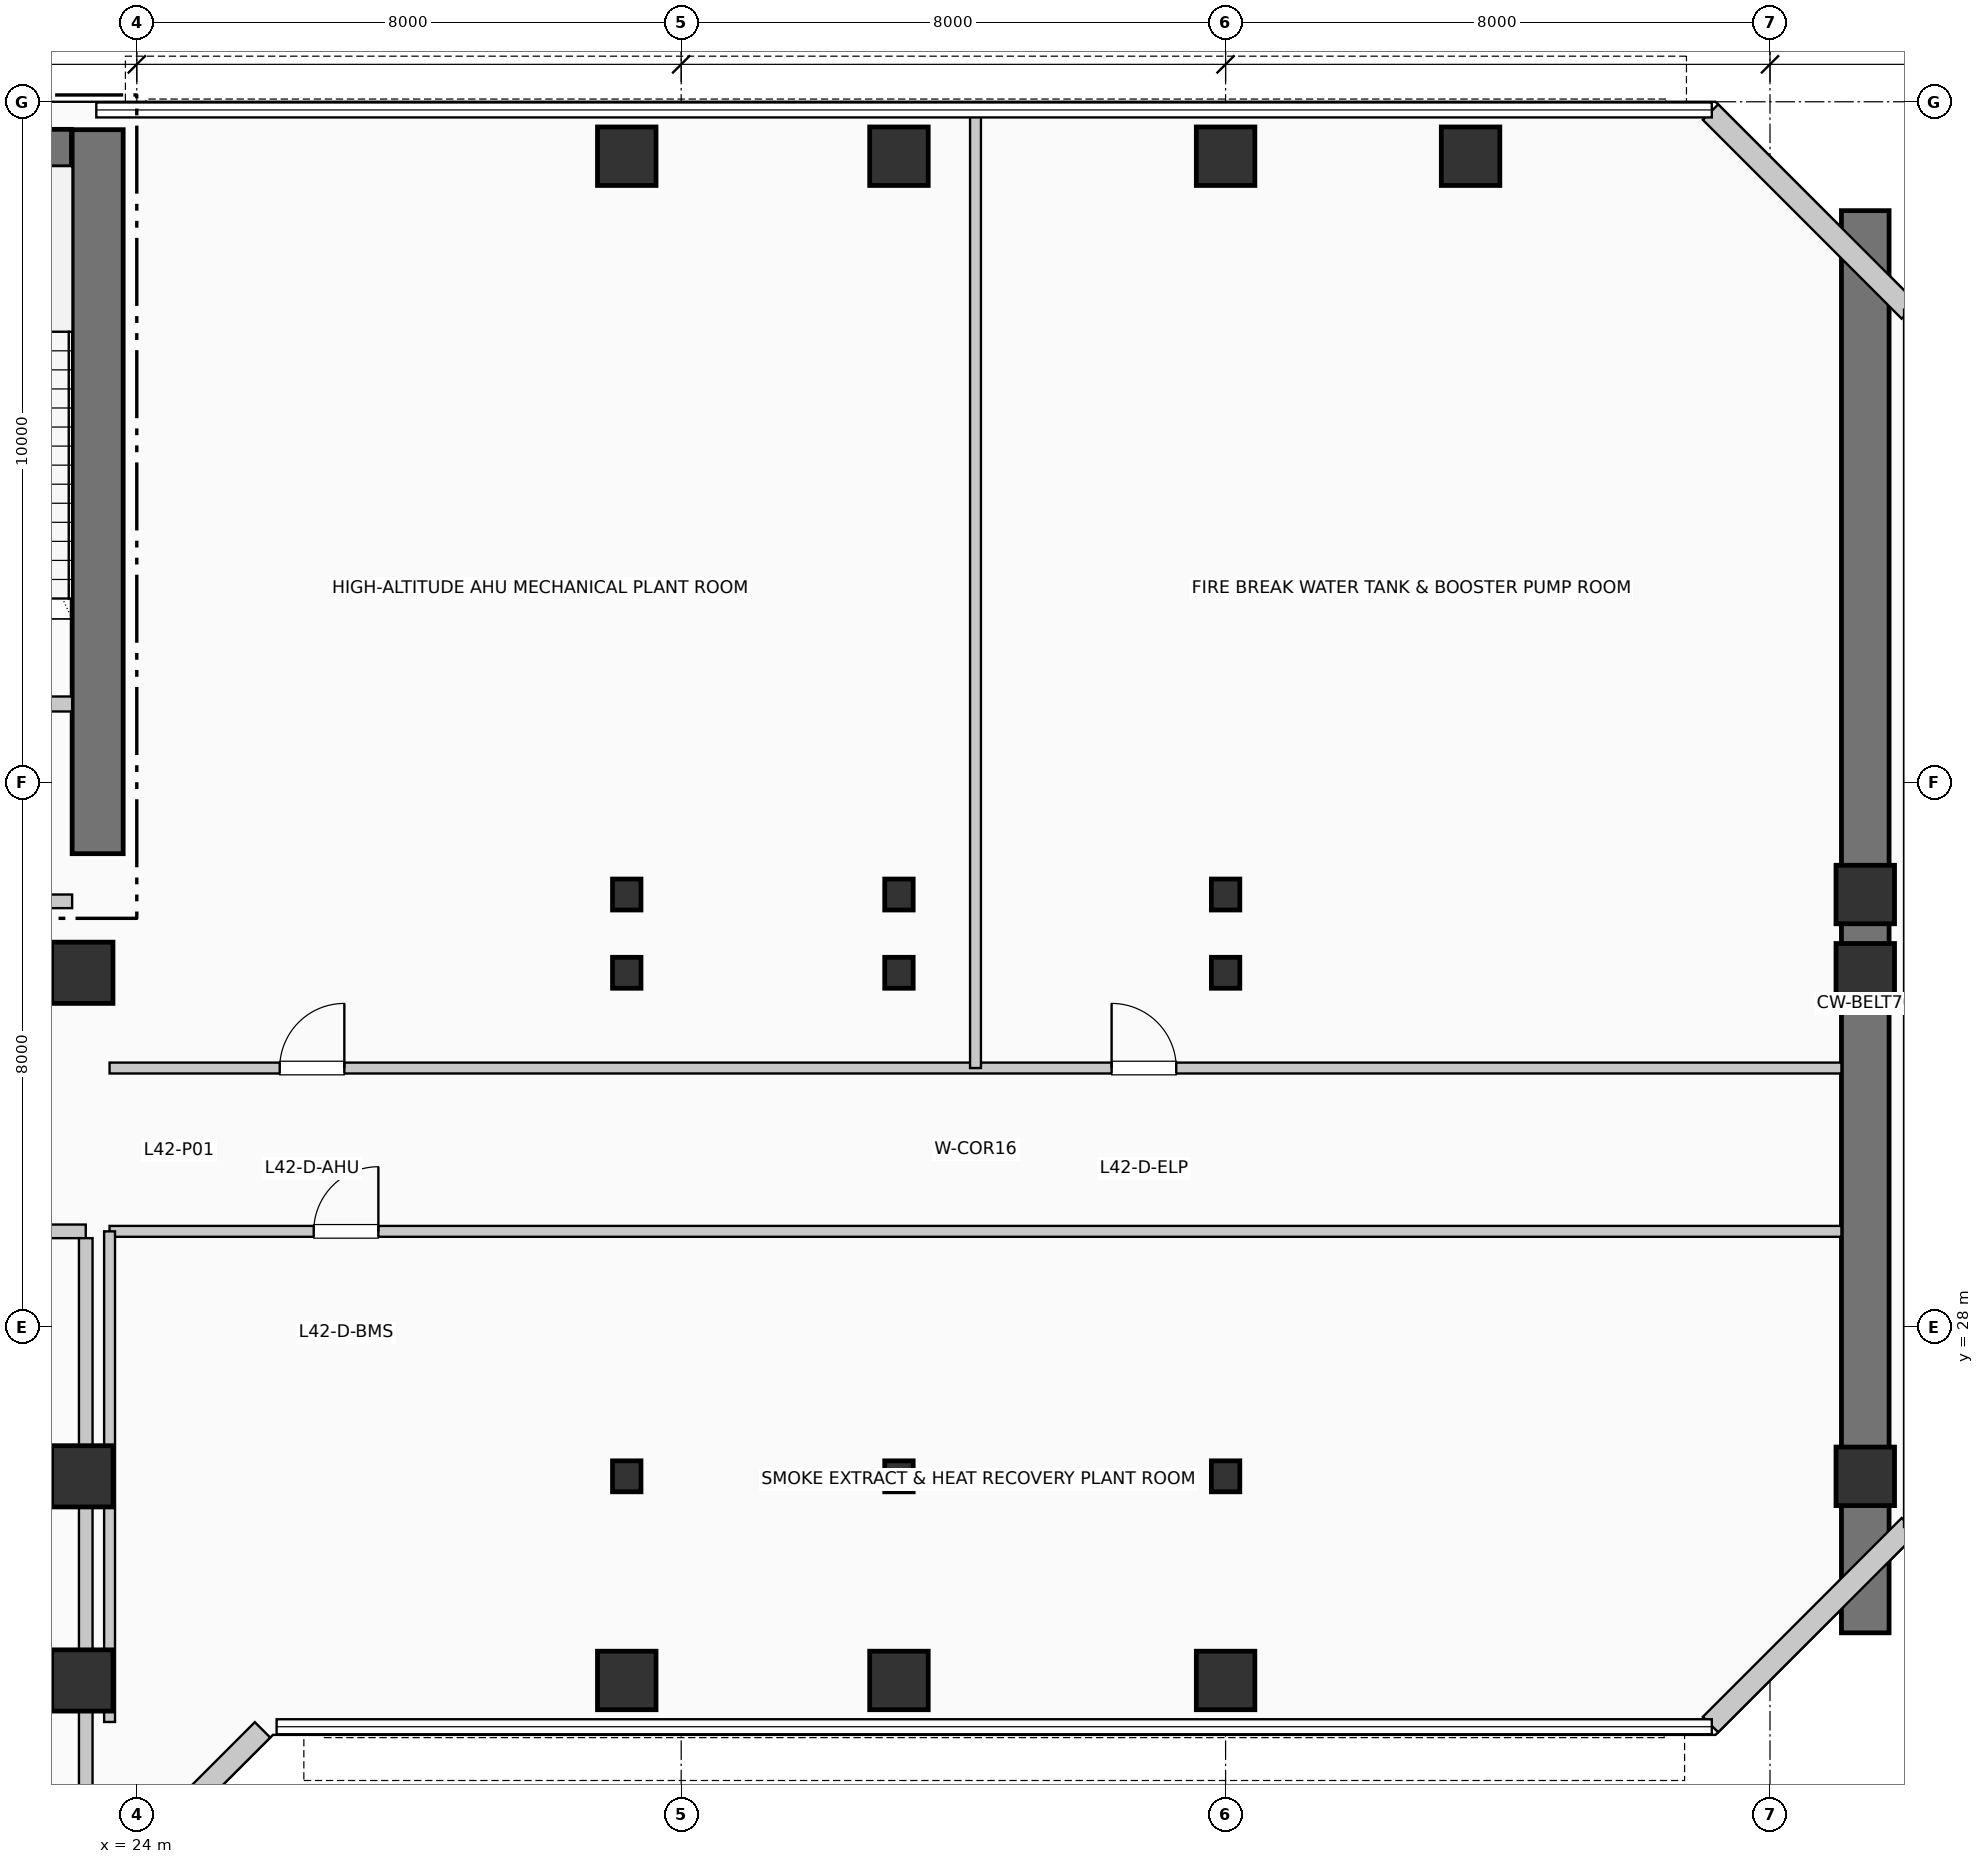
"""IFC4 building model, lengths in metres.
Left out: names, types, materials, properties, quantities, classifications, styles, units other than length and angle.
Written with IfcOpenShell. Run it as: python <this file> out.ifc"""

import sys

from ifc_helpers import new_model, si_unit, direction, frame, frame_2d, origin, origin_2d, place, context, subcontext, project, spatial, rectangle, i_section, extrude, element, fill, save


model = new_model("IFC4")
c1 = context("Model", 3, precision=1e-05, world=origin(), true_north=direction((0.0, 1.0)))
c2 = subcontext(c1, "Body", "Model", "MODEL_VIEW")
j1 = project(units=[si_unit("LENGTHUNIT", "METRE"), si_unit("PLANEANGLEUNIT", "RADIAN")], contexts=[c1])
p1 = place(None, origin())
s1 = spatial("IfcSite", under=j1, at=p1, CompositionType="ELEMENT")
p2 = place(p1, origin())
s2 = spatial("IfcBuilding", under=s1, at=p2, CompositionType="ELEMENT")
p3 = place(p2, frame((0.0, 0.0, 174.57)))
s3 = spatial("IfcBuildingStorey", under=s2, at=p3, CompositionType="ELEMENT", Elevation=174.57)
p4 = place(p3, frame((23.425, 34.95, 0.0), z_axis=(0.0, 0.0, 1.0), x_axis=(0.0, 1.0, 0.0)))
e1 = element("IfcWall", 1, at=p4, inside=s3, PredefinedType="SHEAR", context=c2, shape_type="SweptSolid", body=[
    extrude(rectangle(XDim=10.64, YDim=0.75, at=frame_2d((5.32, 0.0))), origin(), (0.0, 0.0, 1.0), 4.95),
])
p5 = place(p3, frame((19.35, 45.32, 0.0), z_axis=(0.0, 0.0, 1.0), x_axis=(1.0, 0.0, 0.0)))
e2 = element("IfcWall", 2, at=p5, inside=s3, PredefinedType="SHEAR", context=c2, shape_type="SweptSolid", body=[
    extrude(rectangle(XDim=3.69, YDim=0.55, at=frame_2d((1.845, 0.0))), origin(), (0.0, 0.0, 1.0), 4.95),
])
p6 = place(p5, frame((1.15, 0.0, 1.05)))
e3 = element("IfcOpeningElement", 3, at=p6, cuts=e2, PredefinedType="OPENING", context=c2, shape_type="SweptSolid", body=[
    extrude(rectangle(XDim=1.4, YDim=1.8, at=frame_2d((0.7, 0.9))), frame((0.0, 0.285, 0.0), z_axis=(0.0, -1.0, 0.0), x_axis=(1.0, 0.0, 0.0)), (0.0, 0.0, 1.0), 0.57),
])
p7 = place(p3, frame((49.4, 23.5, 0.0), z_axis=(0.0, 0.0, 1.0), x_axis=(0.0, 1.0, 0.0)))
e4 = element("IfcWall", 4, at=p7, inside=s3, PredefinedType="SHEAR", context=c2, shape_type="SweptSolid", body=[
    extrude(rectangle(XDim=20.9, YDim=0.7, at=frame_2d((10.45, 0.0))), origin(), (0.0, 0.0, 1.0), 4.3),
])
for number, where, z_axis, x_axis in (
    (5, (23.2, 22.8, 0.0), (0.0, 0.0, 1.0), (1.0, 0.0, 0.0)),
    (6, (23.2, 25.8, 0.0), (0.0, 0.0, 1.0), (1.0, 0.0, 0.0)),
    (7, (23.2, 33.2, 0.0), (0.0, 0.0, 1.0), (1.0, 0.0, 0.0)),
):
    element("IfcColumn", number, at=place(p3, frame(where, z_axis=z_axis, x_axis=x_axis)), inside=s3, PredefinedType="COLUMN", context=c2, shape_type="SweptSolid", body=[
        extrude(rectangle(XDim=0.9, YDim=0.9, at=origin_2d()), origin(), (0.0, 0.0, 1.0), 4.95),
    ])
p8 = place(p3, frame((31.2, 22.8, 0.0), z_axis=(0.0, 0.0, 1.0), x_axis=(1.0, 0.0, 0.0)))
e8 = element("IfcColumn", 8, at=p8, inside=s3, PredefinedType="COLUMN", context=c2, shape_type="SweptSolid", body=[
    extrude(rectangle(XDim=0.86, YDim=0.86, at=origin_2d()), origin(), (0.0, 0.0, 1.0), 4.95),
])
for number, where, z_axis, x_axis in (
    (9, (31.2, 25.8, 0.0), (0.0, 0.0, 1.0), (1.0, 0.0, 0.0)),
    (10, (31.2, 33.2, 0.0), (0.0, 0.0, 1.0), (1.0, 0.0, 0.0)),
    (11, (31.2, 34.35, 0.0), (0.0, 0.0, 1.0), (1.0, 0.0, 0.0)),
):
    element("IfcColumn", number, at=place(p3, frame(where, z_axis=z_axis, x_axis=x_axis)), inside=s3, PredefinedType="COLUMN", context=c2, shape_type="SweptSolid", body=[
        extrude(i_section(OverallWidth=0.418, OverallDepth=0.455, WebThickness=0.032, FlangeThickness=0.051, at=origin_2d()), origin(), (0.0, 0.0, 1.0), 4.95),
    ])
for number, where, z_axis, x_axis in (
    (12, (31.2, 45.2, 0.0), (0.0, 0.0, 1.0), (1.0, 0.0, 0.0)),
    (13, (35.2, 22.8, 0.0), (0.0, 0.0, 1.0), (1.0, 0.0, 0.0)),
):
    element("IfcColumn", number, at=place(p3, frame(where, z_axis=z_axis, x_axis=x_axis)), inside=s3, PredefinedType="COLUMN", context=c2, shape_type="SweptSolid", body=[
        extrude(rectangle(XDim=0.86, YDim=0.86, at=origin_2d()), origin(), (0.0, 0.0, 1.0), 4.95),
    ])
for number, where, z_axis, x_axis in (
    (14, (35.2, 25.8, 0.0), (0.0, 0.0, 1.0), (1.0, 0.0, 0.0)),
    (15, (35.2, 33.2, 0.0), (0.0, 0.0, 1.0), (1.0, 0.0, 0.0)),
    (16, (35.2, 34.35, 0.0), (0.0, 0.0, 1.0), (1.0, 0.0, 0.0)),
):
    element("IfcColumn", number, at=place(p3, frame(where, z_axis=z_axis, x_axis=x_axis)), inside=s3, PredefinedType="COLUMN", context=c2, shape_type="SweptSolid", body=[
        extrude(i_section(OverallWidth=0.418, OverallDepth=0.455, WebThickness=0.032, FlangeThickness=0.051, at=origin_2d()), origin(), (0.0, 0.0, 1.0), 4.95),
    ])
for number, where, z_axis, x_axis in (
    (17, (35.2, 45.2, 0.0), (0.0, 0.0, 1.0), (1.0, 0.0, 0.0)),
    (18, (40.0, 22.8, 0.0), (0.0, 0.0, 1.0), (1.0, 0.0, 0.0)),
):
    element("IfcColumn", number, at=place(p3, frame(where, z_axis=z_axis, x_axis=x_axis)), inside=s3, PredefinedType="COLUMN", context=c2, shape_type="SweptSolid", body=[
        extrude(rectangle(XDim=0.86, YDim=0.86, at=origin_2d()), origin(), (0.0, 0.0, 1.0), 4.95),
    ])
for number, where, z_axis, x_axis in (
    (19, (40.0, 25.8, 0.0), (0.0, 0.0, 1.0), (1.0, 0.0, 0.0)),
    (20, (40.0, 33.2, 0.0), (0.0, 0.0, 1.0), (1.0, 0.0, 0.0)),
    (21, (40.0, 34.35, 0.0), (0.0, 0.0, 1.0), (1.0, 0.0, 0.0)),
):
    element("IfcColumn", number, at=place(p3, frame(where, z_axis=z_axis, x_axis=x_axis)), inside=s3, PredefinedType="COLUMN", context=c2, shape_type="SweptSolid", body=[
        extrude(i_section(OverallWidth=0.418, OverallDepth=0.455, WebThickness=0.032, FlangeThickness=0.051, at=origin_2d()), origin(), (0.0, 0.0, 1.0), 4.95),
    ])
for number, where, z_axis, x_axis in (
    (22, (40.0, 45.2, 0.0), (0.0, 0.0, 1.0), (1.0, 0.0, 0.0)),
    (23, (43.6, 45.2, 0.0), (0.0, 0.0, 1.0), (1.0, 0.0, 0.0)),
    (24, (49.4, 25.8, 0.0), (0.0, 0.0, 1.0), (1.0, 0.0, 0.0)),
    (25, (49.4, 33.2, 0.0), (0.0, 0.0, 1.0), (1.0, 0.0, 0.0)),
    (26, (49.4, 34.35, 0.0), (0.0, 0.0, 1.0), (1.0, 0.0, 0.0)),
):
    element("IfcColumn", number, at=place(p3, frame(where, z_axis=z_axis, x_axis=x_axis)), inside=s3, PredefinedType="COLUMN", context=c2, shape_type="SweptSolid", body=[
        extrude(rectangle(XDim=0.86, YDim=0.86, at=origin_2d()), origin(), (0.0, 0.0, 1.0), 4.95),
    ])
p9 = place(p3, frame((23.926, 20.152, 0.0), z_axis=(0.0, 0.0, 1.0), x_axis=(0.707106781187, 0.707106781187, 0.0)))
e27 = element("IfcWall", 27, at=p9, inside=s3, PredefinedType="SOLIDWALL", context=c2, shape_type="SweptSolid", body=[
    extrude(rectangle(XDim=2.718, YDim=0.32, at=frame_2d((1.359, 0.0))), origin(), (0.0, 0.0, 1.0), 4.7),
])
for number, where, z_axis, x_axis in (
    (28, (47.126, 22.152, 0.0), (0.0, 0.0, 1.0), (0.707, 0.707, 0.0)),
    (29, (50.048, 42.926, 0.0), (0.0, 0.0, 1.0), (-0.707, 0.707, 0.0)),
):
    element("IfcWall", number, at=place(p3, frame(where, z_axis=z_axis, x_axis=x_axis)), inside=s3, PredefinedType="SOLIDWALL", context=c2, shape_type="SweptSolid", body=[
        extrude(rectangle(XDim=4.133, YDim=0.32, at=frame_2d((2.066, 0.0))), origin(), (0.0, 0.0, 1.0), 4.7),
    ])
p10 = place(p3, frame((19.9, 37.15, 0.0), z_axis=(0.0, 0.0, 1.0), x_axis=(1.0, 0.0, 0.0)))
e30 = element("IfcWall", 30, at=p10, inside=s3, PredefinedType="PARTITIONING", context=c2, shape_type="SweptSolid", body=[
    extrude(rectangle(XDim=3.15, YDim=0.22, at=frame_2d((1.575, 0.0))), origin(), (0.0, 0.0, 1.0), 4.7),
])
p11 = place(p10, frame((2.05, 0.0, 0.0), z_axis=(0.0, 0.0, 1.0), x_axis=(-1.0, 0.0, 0.0)))
e31 = element("IfcOpeningElement", 31, at=p11, cuts=e30, PredefinedType="OPENING", context=c2, shape_type="SweptSolid", body=[
    extrude(rectangle(XDim=1.05, YDim=2.15, at=frame_2d((0.525, 1.075))), frame((0.0, 0.12, 0.0), z_axis=(0.0, -1.0, 0.0), x_axis=(1.0, 0.0, 0.0)), (0.0, 0.0, 1.0), 0.24),
])
p12 = place(p3, frame((19.8, 34.25, 0.0), z_axis=(0.0, 0.0, 1.0), x_axis=(1.0, 0.0, 0.0)))
e32 = element("IfcWall", 32, at=p12, inside=s3, PredefinedType="PARTITIONING", context=c2, shape_type="SweptSolid", body=[
    extrude(rectangle(XDim=3.25, YDim=0.2, at=frame_2d((1.625, 0.0))), origin(), (0.0, 0.0, 1.0), 4.7),
])
p13 = place(p12, frame((2.15, 0.0, 0.0), z_axis=(0.0, 0.0, 1.0), x_axis=(-1.0, 0.0, 0.0)))
e33 = element("IfcOpeningElement", 33, at=p13, cuts=e32, PredefinedType="OPENING", context=c2, shape_type="SweptSolid", body=[
    extrude(rectangle(XDim=1.1, YDim=2.15, at=frame_2d((0.55, 1.075))), frame((0.0, 0.11, 0.0), z_axis=(0.0, -1.0, 0.0), x_axis=(1.0, 0.0, 0.0)), (0.0, 0.0, 1.0), 0.22),
])
p14 = place(p3, frame((0.19, 29.4, 0.0), z_axis=(0.0, 0.0, 1.0), x_axis=(1.0, 0.0, 0.0)))
e34 = element("IfcWall", 34, at=p14, inside=s3, PredefinedType="PARTITIONING", context=c2, shape_type="SweptSolid", body=[
    extrude(rectangle(XDim=23.06, YDim=0.2, at=frame_2d((11.53, 0.0))), origin(), (0.0, 0.0, 1.0), 4.355),
])
p15 = place(p14, frame((3.8, 0.0, 0.0)))
e35 = element("IfcOpeningElement", 35, at=p15, cuts=e34, PredefinedType="OPENING", context=c2, shape_type="SweptSolid", body=[
    extrude(rectangle(XDim=1.1, YDim=2.15, at=frame_2d((0.55, 1.075))), frame((0.0, 0.11, 0.0), z_axis=(0.0, -1.0, 0.0), x_axis=(1.0, 0.0, 0.0)), (0.0, 0.0, 1.0), 0.22),
])
p16 = place(p14, frame((14.5, 0.0, 0.0)))
e36 = element("IfcOpeningElement", 36, at=p16, cuts=e34, PredefinedType="OPENING", context=c2, shape_type="SweptSolid", body=[
    extrude(rectangle(XDim=1.1, YDim=2.15, at=frame_2d((0.55, 1.075))), frame((0.0, 0.11, 0.0), z_axis=(0.0, -1.0, 0.0), x_axis=(1.0, 0.0, 0.0)), (0.0, 0.0, 1.0), 0.22),
])
p17 = place(p3, frame((23.25, 1.15, 0.0), z_axis=(0.0, 0.0, 1.0), x_axis=(0.0, 1.0, 0.0)))
e37 = element("IfcWall", 37, at=p17, inside=s3, PredefinedType="PARTITIONING", context=c2, shape_type="SweptSolid", body=[
    extrude(rectangle(XDim=28.15, YDim=0.2, at=frame_2d((14.075, 0.0))), origin(), (0.0, 0.0, 1.0), 4.035),
])
p18 = place(p3, frame((23.6, 31.8, 0.0), z_axis=(0.0, 0.0, 1.0), x_axis=(1.0, 0.0, 0.0)))
e38 = element("IfcWall", 38, at=p18, inside=s3, PredefinedType="PARTITIONING", context=c2, shape_type="SweptSolid", body=[
    extrude(rectangle(XDim=25.45, YDim=0.16, at=frame_2d((12.725, 0.0))), origin(), (0.0, 0.0, 1.0), 4.7),
])
p19 = place(p18, frame((2.5, 0.0, 0.0)))
e39 = element("IfcOpeningElement", 39, at=p19, cuts=e38, PredefinedType="OPENING", context=c2, shape_type="SweptSolid", body=[
    extrude(rectangle(XDim=0.95, YDim=2.1, at=frame_2d((0.475, 1.05))), frame((0.0, 0.09, 0.0), z_axis=(0.0, -1.0, 0.0), x_axis=(1.0, 0.0, 0.0)), (0.0, 0.0, 1.0), 0.18),
])
p20 = place(p18, frame((14.725, 0.0, 0.0)))
e40 = element("IfcOpeningElement", 40, at=p20, cuts=e38, PredefinedType="OPENING", context=c2, shape_type="SweptSolid", body=[
    extrude(rectangle(XDim=0.95, YDim=2.1, at=frame_2d((0.475, 1.05))), frame((0.0, 0.09, 0.0), z_axis=(0.0, -1.0, 0.0), x_axis=(1.0, 0.0, 0.0)), (0.0, 0.0, 1.0), 0.18),
])
p21 = place(p3, frame((36.325, 31.8, 0.0), z_axis=(0.0, 0.0, 1.0), x_axis=(0.0, 1.0, 0.0)))
e41 = element("IfcWall", 41, at=p21, inside=s3, PredefinedType="PARTITIONING", context=c2, shape_type="SweptSolid", body=[
    extrude(rectangle(XDim=14.01, YDim=0.16, at=frame_2d((7.005, 0.0))), origin(), (0.0, 0.0, 1.0), 4.7),
])
p22 = place(p3, frame((23.6, 29.4, 0.0), z_axis=(0.0, 0.0, 1.0), x_axis=(1.0, 0.0, 0.0)))
e42 = element("IfcWall", 42, at=p22, inside=s3, PredefinedType="PARTITIONING", context=c2, shape_type="SweptSolid", body=[
    extrude(rectangle(XDim=25.45, YDim=0.16, at=frame_2d((12.725, 0.0))), origin(), (0.0, 0.0, 1.0), 4.355),
])
p23 = place(p22, frame((3.0, 0.0, 0.0)))
e43 = element("IfcOpeningElement", 43, at=p23, cuts=e42, PredefinedType="OPENING", context=c2, shape_type="SweptSolid", body=[
    extrude(rectangle(XDim=0.95, YDim=2.1, at=frame_2d((0.475, 1.05))), frame((0.0, 0.09, 0.0), z_axis=(0.0, -1.0, 0.0), x_axis=(1.0, 0.0, 0.0)), (0.0, 0.0, 1.0), 0.18),
])
p24 = place(p3, frame((23.6, 22.19, 0.0), z_axis=(0.0, 0.0, 1.0), x_axis=(0.0, 1.0, 0.0)))
e44 = element("IfcWall", 44, at=p24, inside=s3, PredefinedType="PARTITIONING", context=c2, shape_type="SweptSolid", body=[
    extrude(rectangle(XDim=7.21, YDim=0.16, at=frame_2d((3.605, 0.0))), origin(), (0.0, 0.0, 1.0), 4.035),
])
p25 = place(p19, origin())
e45 = element("IfcDoor", 45, at=p25, inside=s3, OperationType="SINGLE_SWING_RIGHT", PredefinedType="DOOR", context=c2, shape_type="SweptSolid", body=[
    extrude(rectangle(XDim=0.95, YDim=2.1, at=frame_2d((0.475, 1.05))), frame((0.0, 0.025, 0.0), z_axis=(0.0, -1.0, 0.0), x_axis=(1.0, 0.0, 0.0)), (0.0, 0.0, 1.0), 0.05),
])
fill(e39, e45)
p26 = place(p20, origin())
e46 = element("IfcDoor", 46, at=p26, inside=s3, OperationType="SINGLE_SWING_LEFT", PredefinedType="DOOR", context=c2, shape_type="SweptSolid", body=[
    extrude(rectangle(XDim=0.95, YDim=2.1, at=frame_2d((0.475, 1.05))), frame((0.0, 0.025, 0.0), z_axis=(0.0, -1.0, 0.0), x_axis=(1.0, 0.0, 0.0)), (0.0, 0.0, 1.0), 0.05),
])
fill(e40, e46)
p27 = place(p23, origin())
e47 = element("IfcDoor", 47, at=p27, inside=s3, OperationType="SINGLE_SWING_RIGHT", PredefinedType="DOOR", context=c2, shape_type="SweptSolid", body=[
    extrude(rectangle(XDim=0.95, YDim=2.1, at=frame_2d((0.475, 1.05))), frame((0.0, 0.025, 0.0), z_axis=(0.0, -1.0, 0.0), x_axis=(1.0, 0.0, 0.0)), (0.0, 0.0, 1.0), 0.05),
])
fill(e43, e47)
save(model, sys.argv[1])
